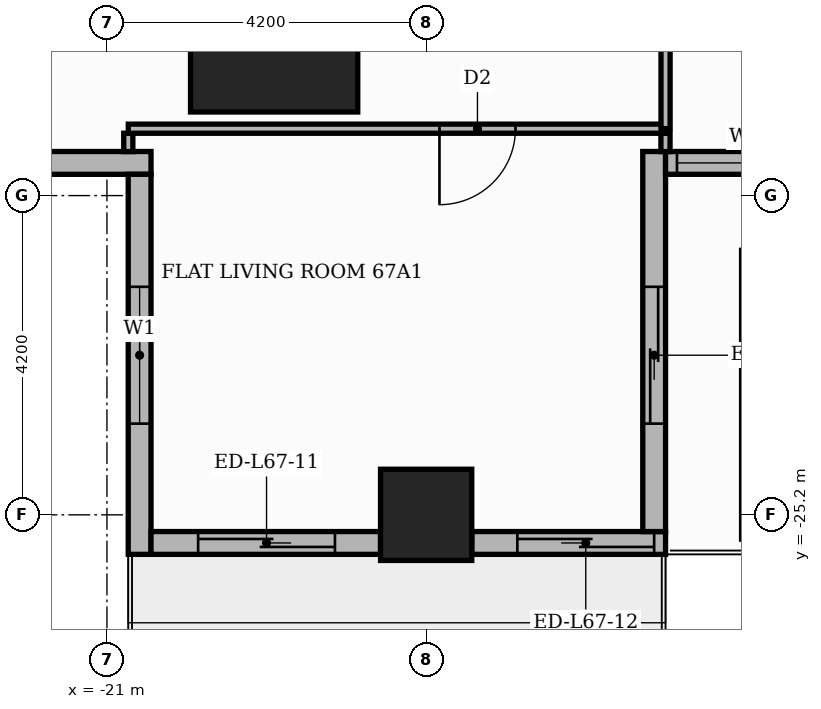
"""IFC4 building model, lengths in metres.
Left out: names, types, materials, properties, quantities, classifications, styles, units other than length and angle.
Written with IfcOpenShell. Run it as: python <this file> out.ifc"""

import sys

from ifc_helpers import new_model, si_unit, direction, frame, frame_2d, origin, origin_2d, place, context, subcontext, project, spatial, rectangle, extrude, element, fill, save


model = new_model("IFC4")
c1 = context("Model", 3, precision=1e-05, world=origin(), true_north=direction((0.0, 1.0)))
c2 = subcontext(c1, "Body", "Model", "MODEL_VIEW")
j1 = project(units=[si_unit("LENGTHUNIT", "METRE"), si_unit("PLANEANGLEUNIT", "RADIAN")], contexts=[c1])
p1 = place(None, origin())
s1 = spatial("IfcSite", under=j1, at=p1, CompositionType="ELEMENT")
p2 = place(p1, origin())
s2 = spatial("IfcBuilding", under=s1, at=p2, CompositionType="ELEMENT")
p3 = place(p2, frame((0.0, 0.0, 279.6)))
s3 = spatial("IfcBuildingStorey", under=s2, at=p3, CompositionType="ELEMENT", Elevation=279.6)
p4 = place(p3, frame((-18.8, -18.8, 0.0), z_axis=(0.0, 0.0, 1.0), x_axis=(1.0, 0.0, 0.0)))
e1 = element("IfcColumn", 1, at=p4, inside=s3, PredefinedType="COLUMN", context=c2, shape_type="SweptSolid", body=[
    extrude(rectangle(XDim=2.2, YDim=2.2, at=origin_2d()), origin(), (0.0, 0.0, 1.0), 3.9),
])
p5 = place(p3, frame((-16.8, -25.2, 0.0), z_axis=(0.0, 0.0, 1.0), x_axis=(1.0, 0.0, 0.0)))
e2 = element("IfcColumn", 2, at=p5, inside=s3, PredefinedType="COLUMN", context=c2, shape_type="SweptSolid", body=[
    extrude(rectangle(XDim=1.2, YDim=1.2, at=origin_2d()), origin(), (0.0, 0.0, 1.0), 3.9),
])
p6 = place(p3, frame((-25.42, -20.57, 0.0), z_axis=(0.0, 0.0, 1.0), x_axis=(1.0, 0.0, 0.0)))
e3 = element("IfcWall", 3, at=p6, inside=s3, PredefinedType="STANDARD", context=c2, shape_type="SweptSolid", body=[
    extrude(rectangle(XDim=5.0, YDim=0.3, at=frame_2d((2.5, 0.0))), origin(), (0.0, 0.0, 1.0), 3.48),
])
p7 = place(p6, frame((1.42, 0.0, 0.9)))
e4 = element("IfcOpeningElement", 4, at=p7, cuts=e3, PredefinedType="OPENING", context=c2, shape_type="SweptSolid", body=[
    extrude(rectangle(XDim=1.8, YDim=2.1, at=frame_2d((0.9, 1.05))), frame((0.0, 0.16, 0.0), z_axis=(0.0, -1.0, 0.0), x_axis=(1.0, 0.0, 0.0)), (0.0, 0.0, 1.0), 0.32),
])
p8 = place(p3, frame((-20.57, -20.72, 0.0), z_axis=(0.0, 0.0, 1.0), x_axis=(0.0, -1.0, 0.0)))
e5 = element("IfcWall", 5, at=p8, inside=s3, PredefinedType="STANDARD", context=c2, shape_type="SweptSolid", body=[
    extrude(rectangle(XDim=5.0, YDim=0.3, at=frame_2d((2.5, 0.0))), origin(), (0.0, 0.0, 1.0), 3.48),
])
p9 = place(p8, frame((1.48, 0.0, 0.9)))
e6 = element("IfcOpeningElement", 6, at=p9, cuts=e5, PredefinedType="OPENING", context=c2, shape_type="SweptSolid", body=[
    extrude(rectangle(XDim=1.8, YDim=2.1, at=frame_2d((0.9, 1.05))), frame((0.0, 0.16, 0.0), z_axis=(0.0, -1.0, 0.0), x_axis=(1.0, 0.0, 0.0)), (0.0, 0.0, 1.0), 0.32),
])
p10 = place(p3, frame((-20.42, -25.57, 0.0), z_axis=(0.0, 0.0, 1.0), x_axis=(1.0, 0.0, 0.0)))
e7 = element("IfcWall", 7, at=p10, inside=s3, PredefinedType="STANDARD", context=c2, shape_type="SweptSolid", body=[
    extrude(rectangle(XDim=3.02, YDim=0.3, at=frame_2d((1.51, 0.0))), origin(), (0.0, 0.0, 1.0), 3.48),
])
p11 = place(p10, frame((0.62, 0.0, 0.0)))
e8 = element("IfcOpeningElement", 8, at=p11, cuts=e7, PredefinedType="OPENING", context=c2, shape_type="SweptSolid", body=[
    extrude(rectangle(XDim=1.8, YDim=2.4, at=frame_2d((0.9, 1.2))), frame((0.0, 0.16, 0.0), z_axis=(0.0, -1.0, 0.0), x_axis=(1.0, 0.0, 0.0)), (0.0, 0.0, 1.0), 0.32),
])
p12 = place(p3, frame((-16.2, -25.57, 0.0), z_axis=(0.0, 0.0, 1.0), x_axis=(1.0, 0.0, 0.0)))
e9 = element("IfcWall", 9, at=p12, inside=s3, PredefinedType="STANDARD", context=c2, shape_type="SweptSolid", body=[
    extrude(rectangle(XDim=2.55, YDim=0.3, at=frame_2d((1.275, 0.0))), origin(), (0.0, 0.0, 1.0), 3.48),
])
p13 = place(p12, frame((0.6, 0.0, 0.0)))
e10 = element("IfcOpeningElement", 10, at=p13, cuts=e9, PredefinedType="OPENING", context=c2, shape_type="SweptSolid", body=[
    extrude(rectangle(XDim=1.8, YDim=2.4, at=frame_2d((0.9, 1.2))), frame((0.0, 0.16, 0.0), z_axis=(0.0, -1.0, 0.0), x_axis=(1.0, 0.0, 0.0)), (0.0, 0.0, 1.0), 0.32),
])
p14 = place(p3, frame((-13.8, -25.42, 0.0), z_axis=(0.0, 0.0, 1.0), x_axis=(0.0, 1.0, 0.0)))
e11 = element("IfcWall", 11, at=p14, inside=s3, PredefinedType="STANDARD", context=c2, shape_type="SweptSolid", body=[
    extrude(rectangle(XDim=5.0, YDim=0.3, at=frame_2d((2.5, 0.0))), origin(), (0.0, 0.0, 1.0), 3.48),
])
p15 = place(p14, frame((1.42, 0.0, 0.0)))
e12 = element("IfcOpeningElement", 12, at=p15, cuts=e11, PredefinedType="OPENING", context=c2, shape_type="SweptSolid", body=[
    extrude(rectangle(XDim=1.8, YDim=2.4, at=frame_2d((0.9, 1.2))), frame((0.0, 0.16, 0.0), z_axis=(0.0, -1.0, 0.0), x_axis=(1.0, 0.0, 0.0)), (0.0, 0.0, 1.0), 0.32),
])
p16 = place(p3, frame((-13.65, -20.57, 0.0), z_axis=(0.0, 0.0, 1.0), x_axis=(1.0, 0.0, 0.0)))
e13 = element("IfcWall", 13, at=p16, inside=s3, PredefinedType="STANDARD", context=c2, shape_type="SweptSolid", body=[
    extrude(rectangle(XDim=27.6, YDim=0.3, at=frame_2d((13.8, 0.0))), origin(), (0.0, 0.0, 1.0), 3.48),
])
p17 = place(p16, frame((0.15, 0.0, 0.9)))
e14 = element("IfcOpeningElement", 14, at=p17, cuts=e13, PredefinedType="OPENING", context=c2, shape_type="SweptSolid", body=[
    extrude(rectangle(XDim=1.8, YDim=2.1, at=frame_2d((0.9, 1.05))), frame((0.0, 0.16, 0.0), z_axis=(0.0, -1.0, 0.0), x_axis=(1.0, 0.0, 0.0)), (0.0, 0.0, 1.0), 0.32),
])
p18 = place(p16, frame((2.25, 0.0, 0.9)))
e15 = element("IfcOpeningElement", 15, at=p18, cuts=e13, PredefinedType="OPENING", context=c2, shape_type="SweptSolid", body=[
    extrude(rectangle(XDim=6.0, YDim=2.1, at=frame_2d((3.0, 1.05))), frame((0.0, 0.16, 0.0), z_axis=(0.0, -1.0, 0.0), x_axis=(1.0, 0.0, 0.0)), (0.0, 0.0, 1.0), 0.32),
])
p19 = place(p16, frame((8.55, 0.0, 0.9)))
e16 = element("IfcOpeningElement", 16, at=p19, cuts=e13, PredefinedType="OPENING", context=c2, shape_type="SweptSolid", body=[
    extrude(rectangle(XDim=6.0, YDim=2.1, at=frame_2d((3.0, 1.05))), frame((0.0, 0.16, 0.0), z_axis=(0.0, -1.0, 0.0), x_axis=(1.0, 0.0, 0.0)), (0.0, 0.0, 1.0), 0.32),
])
p20 = place(p16, frame((14.85, 0.0, 0.9)))
e17 = element("IfcOpeningElement", 17, at=p20, cuts=e13, PredefinedType="OPENING", context=c2, shape_type="SweptSolid", body=[
    extrude(rectangle(XDim=6.0, YDim=2.1, at=frame_2d((3.0, 1.05))), frame((0.0, 0.16, 0.0), z_axis=(0.0, -1.0, 0.0), x_axis=(1.0, 0.0, 0.0)), (0.0, 0.0, 1.0), 0.32),
])
p21 = place(p16, frame((21.15, 0.0, 0.9)))
e18 = element("IfcOpeningElement", 18, at=p21, cuts=e13, PredefinedType="OPENING", context=c2, shape_type="SweptSolid", body=[
    extrude(rectangle(XDim=6.0, YDim=2.1, at=frame_2d((3.0, 1.05))), frame((0.0, 0.16, 0.0), z_axis=(0.0, -1.0, 0.0), x_axis=(1.0, 0.0, 0.0)), (0.0, 0.0, 1.0), 0.32),
])
for number, where, z_axis, x_axis in (
    (19, (-20.719, -20.421, 0.0), (0.0, 0.0, 1.0), (0.0, 1.0, 0.0)),
    (20, (-13.651, -20.421, 0.0), (0.0, 0.0, 1.0), (0.0, 1.0, 0.0)),
):
    element("IfcWall", number, at=place(p3, frame(where, z_axis=z_axis, x_axis=x_axis)), inside=s3, PredefinedType="PARTITIONING", context=c2, shape_type="SweptSolid", body=[
        extrude(rectangle(XDim=0.241, YDim=0.12, at=frame_2d((0.121, 0.0))), origin(), (0.0, 0.0, 1.0), 3.48),
    ])
p22 = place(p3, frame((-20.719, -20.12, 0.0), z_axis=(0.0, 0.0, 1.0), x_axis=(1.0, 0.0, 0.0)))
e21 = element("IfcWall", 21, at=p22, inside=s3, PredefinedType="PARTITIONING", context=c2, shape_type="SweptSolid", body=[
    extrude(rectangle(XDim=7.068, YDim=0.12, at=frame_2d((3.534, 0.0))), origin(), (0.0, 0.0, 1.0), 3.48),
])
p23 = place(p22, frame((4.094, 0.0, 0.0)))
e22 = element("IfcOpeningElement", 22, at=p23, cuts=e21, PredefinedType="OPENING", context=c2, shape_type="SweptSolid", body=[
    extrude(rectangle(XDim=1.0, YDim=2.1, at=frame_2d((0.5, 1.05))), frame((0.0, 0.07, 0.0), z_axis=(0.0, -1.0, 0.0), x_axis=(1.0, 0.0, 0.0)), (0.0, 0.0, 1.0), 0.14),
])
p24 = place(p3, frame((-13.65, -20.119, 0.0), z_axis=(0.0, 0.0, 1.0), x_axis=(0.0, 1.0, 0.0)))
e23 = element("IfcWall", 23, at=p24, inside=s3, PredefinedType="PARTITIONING", context=c2, shape_type="SweptSolid", body=[
    extrude(rectangle(XDim=6.369, YDim=0.12, at=frame_2d((3.185, 0.0))), origin(), (0.0, 0.0, 1.0), 3.48),
])
p25 = place(p24, frame((2.784, 0.0, 0.0)))
e24 = element("IfcOpeningElement", 24, at=p25, cuts=e23, PredefinedType="OPENING", context=c2, shape_type="SweptSolid", body=[
    extrude(rectangle(XDim=0.9, YDim=2.1, at=frame_2d((0.45, 1.05))), frame((0.0, 0.07, 0.0), z_axis=(0.0, -1.0, 0.0), x_axis=(1.0, 0.0, 0.0)), (0.0, 0.0, 1.0), 0.14),
])
p26 = place(p9, origin())
e25 = element("IfcWindow", 25, at=p26, inside=s3, PartitioningType="SINGLE_PANEL", PredefinedType="WINDOW", context=c2, shape_type="SweptSolid", body=[
    extrude(rectangle(XDim=1.8, YDim=2.1, at=frame_2d((0.9, 1.05))), frame((0.0, 0.03, 0.0), z_axis=(0.0, -1.0, 0.0), x_axis=(1.0, 0.0, 0.0)), (0.0, 0.0, 1.0), 0.06),
])
fill(e6, e25)
p27 = place(p11, origin())
e26 = element("IfcDoor", 26, at=p27, inside=s3, OperationType="SLIDING_TO_RIGHT", PredefinedType="DOOR", context=c2, shape_type="SweptSolid", body=[
    extrude(rectangle(XDim=1.8, YDim=2.4, at=frame_2d((0.9, 1.2))), frame((0.0, 0.025, 0.0), z_axis=(0.0, -1.0, 0.0), x_axis=(1.0, 0.0, 0.0)), (0.0, 0.0, 1.0), 0.05),
])
fill(e8, e26)
p28 = place(p13, origin())
e27 = element("IfcDoor", 27, at=p28, inside=s3, OperationType="SLIDING_TO_LEFT", PredefinedType="DOOR", context=c2, shape_type="SweptSolid", body=[
    extrude(rectangle(XDim=1.8, YDim=2.4, at=frame_2d((0.9, 1.2))), frame((0.0, 0.025, 0.0), z_axis=(0.0, -1.0, 0.0), x_axis=(1.0, 0.0, 0.0)), (0.0, 0.0, 1.0), 0.05),
])
fill(e10, e27)
p29 = place(p15, origin())
e28 = element("IfcDoor", 28, at=p29, inside=s3, OperationType="SLIDING_TO_LEFT", PredefinedType="DOOR", context=c2, shape_type="SweptSolid", body=[
    extrude(rectangle(XDim=1.8, YDim=2.4, at=frame_2d((0.9, 1.2))), frame((0.0, 0.025, 0.0), z_axis=(0.0, -1.0, 0.0), x_axis=(1.0, 0.0, 0.0)), (0.0, 0.0, 1.0), 0.05),
])
fill(e12, e28)
p30 = place(p17, origin())
e29 = element("IfcWindow", 29, at=p30, inside=s3, PartitioningType="SINGLE_PANEL", PredefinedType="WINDOW", context=c2, shape_type="SweptSolid", body=[
    extrude(rectangle(XDim=1.8, YDim=2.1, at=frame_2d((0.9, 1.05))), frame((0.0, 0.03, 0.0), z_axis=(0.0, -1.0, 0.0), x_axis=(1.0, 0.0, 0.0)), (0.0, 0.0, 1.0), 0.06),
])
fill(e14, e29)
p31 = place(p23, frame((1.0, 0.0, 0.0), z_axis=(0.0, 0.0, 1.0), x_axis=(-1.0, 0.0, 0.0)))
e30 = element("IfcDoor", 30, at=p31, inside=s3, OperationType="SINGLE_SWING_LEFT", PredefinedType="DOOR", context=c2, shape_type="SweptSolid", body=[
    extrude(rectangle(XDim=1.0, YDim=2.1, at=frame_2d((0.5, 1.05))), frame((0.0, 0.025, 0.0), z_axis=(0.0, -1.0, 0.0), x_axis=(1.0, 0.0, 0.0)), (0.0, 0.0, 1.0), 0.05),
])
fill(e22, e30)
save(model, sys.argv[1])
